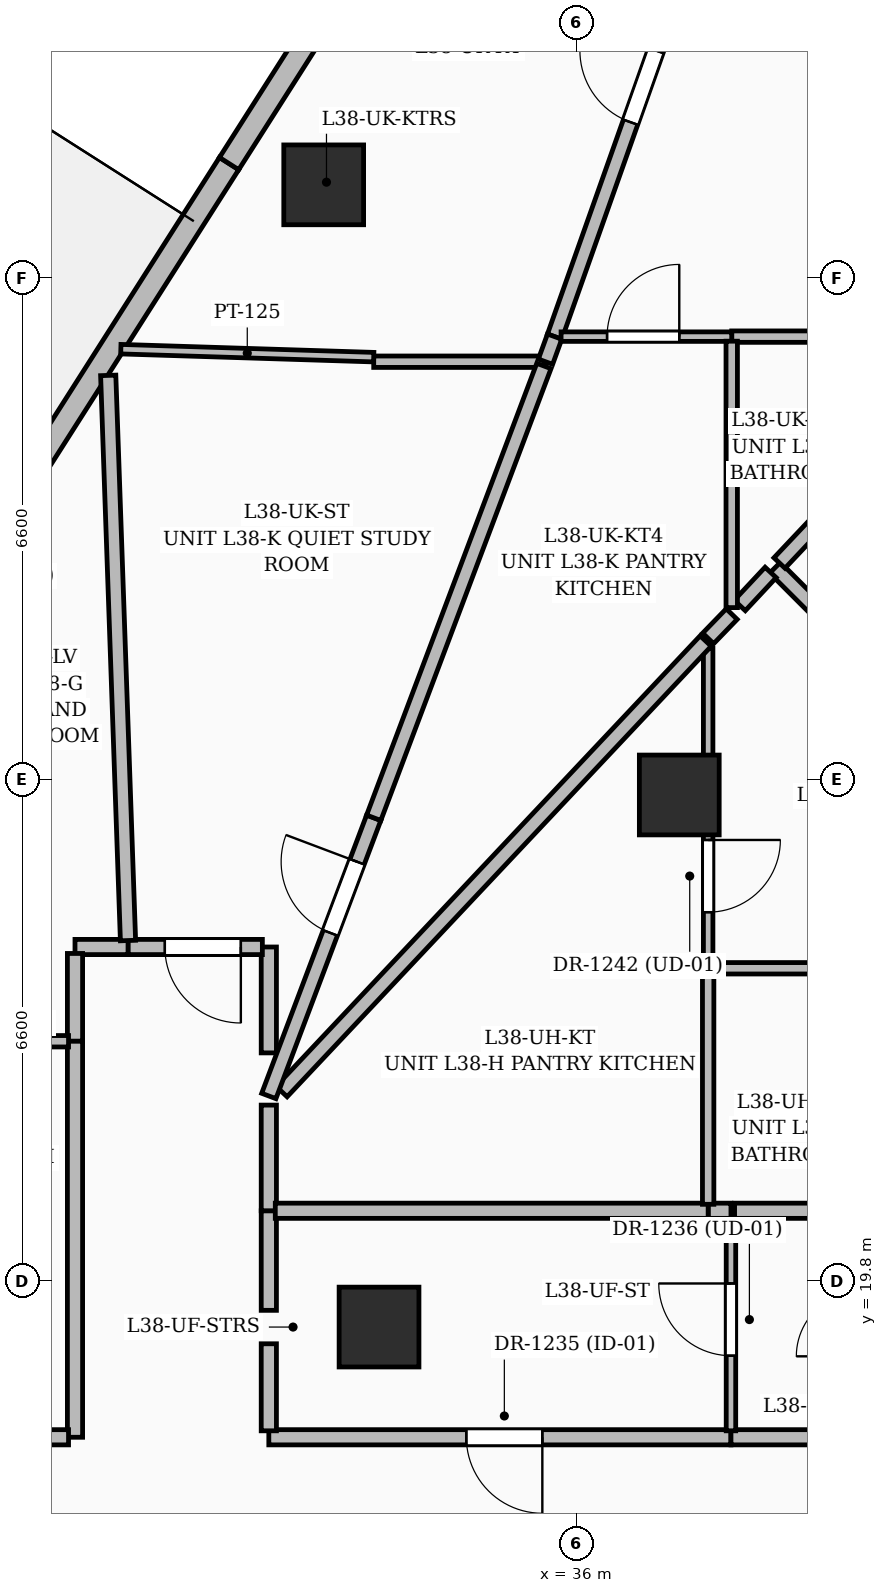
"""IFC4 building model, lengths in metres.
Left out: names, types, materials, properties, quantities, classifications, styles, units other than length and angle.
Written with IfcOpenShell. Run it as: python <this file> out.ifc"""

import sys

from ifc_helpers import new_model, si_unit, direction, frame, frame_2d, origin, origin_2d, place, context, subcontext, project, spatial, rectangle, extrude, element, fill, save


model = new_model("IFC4")
c1 = context("Model", 3, precision=1e-05, world=origin(), true_north=direction((0.0, 1.0)))
c2 = subcontext(c1, "Body", "Model", "MODEL_VIEW")
j1 = project(units=[si_unit("LENGTHUNIT", "METRE"), si_unit("PLANEANGLEUNIT", "RADIAN")], contexts=[c1])
p1 = place(None, origin())
s1 = spatial("IfcSite", under=j1, at=p1, CompositionType="ELEMENT")
p2 = place(p1, origin())
s2 = spatial("IfcBuilding", under=s1, at=p2, CompositionType="ELEMENT")
p3 = place(p2, frame((0.0, 0.0, 150.0)))
s3 = spatial("IfcBuildingStorey", under=s2, at=p3, CompositionType="ELEMENT", Elevation=150.0)
for number, where, z_axis, x_axis in (
    (1, (37.35, 26.2, 0.0), (0.0, 0.0, 1.0), (1.0, 0.0, 0.0)),
    (2, (33.4, 19.2, 0.0), (0.0, 0.0, 1.0), (1.0, 0.0, 0.0)),
    (3, (32.672, 34.227, 0.0), (0.0, 0.0, 1.0), (1.0, 0.0, 0.0)),
):
    element("IfcColumn", number, at=place(p3, frame(where, z_axis=z_axis, x_axis=x_axis)), inside=s3, PredefinedType="COLUMN", context=c2, shape_type="SweptSolid", body=[
        extrude(rectangle(XDim=1.05, YDim=1.05, at=origin_2d()), origin(), (0.0, 0.0, 1.0), 3.6),
    ])
p4 = place(p3, frame((27.328, 28.069, 0.0), z_axis=(0.0, 0.0, 1.0), x_axis=(0.537125937868, 0.843502060975, 0.0)))
e4 = element("IfcWall", 4, at=p4, inside=s3, PredefinedType="SOLIDWALL", context=c2, shape_type="SweptSolid", body=[
    extrude(rectangle(XDim=7.632, YDim=0.3, at=frame_2d((3.816, 0.0))), origin(), (0.0, 0.0, 1.0), 3.35),
])
p5 = place(p4, frame((2.038, 0.0, 0.0)))
e5 = element("IfcOpeningElement", 5, at=p5, cuts=e4, PredefinedType="OPENING", context=c2, shape_type="SweptSolid", body=[
    extrude(rectangle(XDim=1.0, YDim=2.2, at=frame_2d((0.5, 1.1))), frame((0.0, 0.16, 0.0), z_axis=(0.0, -1.0, 0.0), x_axis=(1.0, 0.0, 0.0)), (0.0, 0.0, 1.0), 0.32),
])
p6 = place(p3, frame((31.427, 34.507, 0.0), z_axis=(0.0, 0.0, 1.0), x_axis=(0.537111444199, 0.843511290091, 0.0)))
e6 = element("IfcWall", 6, at=p6, inside=s3, PredefinedType="SOLIDWALL", context=c2, shape_type="SweptSolid", body=[
    extrude(rectangle(XDim=7.632, YDim=0.3, at=frame_2d((3.816, 0.0))), origin(), (0.0, 0.0, 1.0), 3.35),
])
p7 = place(p6, frame((2.325, 0.0, 0.6)))
e7 = element("IfcOpeningElement", 7, at=p7, cuts=e6, PredefinedType="OPENING", context=c2, shape_type="SweptSolid", body=[
    extrude(rectangle(XDim=2.4, YDim=2.1, at=frame_2d((1.2, 1.05))), frame((0.0, 0.16, 0.0), z_axis=(0.0, -1.0, 0.0), x_axis=(1.0, 0.0, 0.0)), (0.0, 0.0, 1.0), 0.32),
])
p8 = place(p3, frame((38.03, 17.75, 0.0), z_axis=(0.0, 0.0, 1.0), x_axis=(-1.0, 0.0, 0.0)))
e8 = element("IfcWall", 8, at=p8, inside=s3, PredefinedType="PARTITIONING", context=c2, shape_type="SweptSolid", body=[
    extrude(rectangle(XDim=6.08, YDim=0.2, at=frame_2d((3.04, 0.0))), origin(), (0.0, 0.0, 1.0), 2.436),
])
p9 = place(p8, frame((2.481, 0.0, 0.0)))
e9 = element("IfcOpeningElement", 9, at=p9, cuts=e8, PredefinedType="OPENING", context=c2, shape_type="SweptSolid", body=[
    extrude(rectangle(XDim=1.0, YDim=2.2, at=frame_2d((0.5, 1.1))), frame((0.0, 0.11, 0.0), z_axis=(0.0, -1.0, 0.0), x_axis=(1.0, 0.0, 0.0)), (0.0, 0.0, 1.0), 0.22),
])
p10 = place(p3, frame((31.95, 17.835, 0.0), z_axis=(0.0, 0.0, 1.0), x_axis=(0.0, 1.0, 0.0)))
e10 = element("IfcWall", 10, at=p10, inside=s3, PredefinedType="PARTITIONING", context=c2, shape_type="SweptSolid", body=[
    extrude(rectangle(XDim=1.145, YDim=0.2, at=frame_2d((0.573, 0.0))), origin(), (0.0, 0.0, 1.0), 3.35),
])
p11 = place(p3, frame((31.95, 19.42, 0.0), z_axis=(0.0, 0.0, 1.0), x_axis=(0.0, 1.0, 0.0)))
e11 = element("IfcWall", 11, at=p11, inside=s3, PredefinedType="PARTITIONING", context=c2, shape_type="SweptSolid", body=[
    extrude(rectangle(XDim=1.31, YDim=0.2, at=frame_2d((0.655, 0.0))), origin(), (0.0, 0.0, 1.0), 1.12),
])
p12 = place(p3, frame((39.74, 17.75, 0.0), z_axis=(0.0, 0.0, 1.0), x_axis=(-1.0, 0.0, 0.0)))
e12 = element("IfcWall", 12, at=p12, inside=s3, PredefinedType="PARTITIONING", context=c2, shape_type="SweptSolid", body=[
    extrude(rectangle(XDim=1.71, YDim=0.2, at=frame_2d((0.855, 0.0))), origin(), (0.0, 0.0, 1.0), 3.35),
])
p13 = place(p3, frame((30.1, 24.2, 0.0), z_axis=(0.0, 0.0, 1.0), x_axis=(-1.0, 0.0, 0.0)))
e13 = element("IfcWall", 13, at=p13, inside=s3, PredefinedType="PARTITIONING", context=c2, shape_type="SweptSolid", body=[
    extrude(rectangle(XDim=0.7, YDim=0.2, at=frame_2d((0.35, 0.0))), origin(), (0.0, 0.0, 1.0), 1.12),
])
p14 = place(p3, frame((29.4, 24.115, 0.0), z_axis=(0.0, 0.0, 1.0), x_axis=(0.0, -1.0, 0.0)))
e14 = element("IfcWall", 14, at=p14, inside=s3, PredefinedType="PARTITIONING", context=c2, shape_type="SweptSolid", body=[
    extrude(rectangle(XDim=1.155, YDim=0.2, at=frame_2d((0.578, 0.0))), origin(), (0.0, 0.0, 1.0), 1.12),
])
p15 = place(p3, frame((29.4, 22.96, 0.0), z_axis=(0.0, 0.0, 1.0), x_axis=(0.0, -1.0, 0.0)))
e15 = element("IfcWall", 15, at=p15, inside=s3, PredefinedType="PARTITIONING", context=c2, shape_type="SweptSolid", body=[
    extrude(rectangle(XDim=5.21, YDim=0.2, at=frame_2d((2.605, 0.0))), origin(), (0.0, 0.0, 1.0), 1.12),
])
p16 = place(p3, frame((29.315, 17.75, 0.0), z_axis=(0.0, 0.0, 1.0), x_axis=(-1.0, 0.0, 0.0)))
e16 = element("IfcWall", 16, at=p16, inside=s3, PredefinedType="PARTITIONING", context=c2, shape_type="SweptSolid", body=[
    extrude(rectangle(XDim=2.115, YDim=0.2, at=frame_2d((1.058, 0.0))), origin(), (0.0, 0.0, 1.0), 2.86),
])
p17 = place(p16, frame((0.515, 0.0, 0.0)))
e17 = element("IfcOpeningElement", 17, at=p17, cuts=e16, PredefinedType="OPENING", context=c2, shape_type="SweptSolid", body=[
    extrude(rectangle(XDim=1.0, YDim=2.2, at=frame_2d((0.5, 1.1))), frame((0.0, 0.11, 0.0), z_axis=(0.0, -1.0, 0.0), x_axis=(1.0, 0.0, 0.0)), (0.0, 0.0, 1.0), 0.22),
])
p18 = place(p3, frame((31.95, 20.73, 0.0), z_axis=(0.0, 0.0, 1.0), x_axis=(0.0, 1.0, 0.0)))
e18 = element("IfcWall", 18, at=p18, inside=s3, PredefinedType="PARTITIONING", context=c2, shape_type="SweptSolid", body=[
    extrude(rectangle(XDim=1.39, YDim=0.2, at=frame_2d((0.695, 0.0))), origin(), (0.0, 0.0, 1.0), 1.12),
])
p19 = place(p3, frame((31.95, 22.807, 0.0), z_axis=(0.0, 0.0, 1.0), x_axis=(0.0, 1.0, 0.0)))
e19 = element("IfcWall", 19, at=p19, inside=s3, PredefinedType="PARTITIONING", context=c2, shape_type="SweptSolid", body=[
    extrude(rectangle(XDim=1.393, YDim=0.2, at=frame_2d((0.697, 0.0))), origin(), (0.0, 0.0, 1.0), 3.35),
])
p20 = place(p3, frame((31.865, 24.2, 0.0), z_axis=(0.0, 0.0, 1.0), x_axis=(-1.0, 0.0, 0.0)))
e20 = element("IfcWall", 20, at=p20, inside=s3, PredefinedType="PARTITIONING", context=c2, shape_type="SweptSolid", body=[
    extrude(rectangle(XDim=1.765, YDim=0.2, at=frame_2d((0.882, 0.0))), origin(), (0.0, 0.0, 1.0), 2.86),
])
p21 = place(p20, frame((0.283, 0.0, 0.0)))
e21 = element("IfcOpeningElement", 21, at=p21, cuts=e20, PredefinedType="OPENING", context=c2, shape_type="SweptSolid", body=[
    extrude(rectangle(XDim=1.0, YDim=2.2, at=frame_2d((0.5, 1.1))), frame((0.0, 0.11, 0.0), z_axis=(0.0, -1.0, 0.0), x_axis=(1.0, 0.0, 0.0)), (0.0, 0.0, 1.0), 0.22),
])
p22 = place(p3, frame((38.03, 17.835, 0.0), z_axis=(0.0, 0.0, 1.0), x_axis=(0.0, 1.0, 0.0)))
e22 = element("IfcWall", 22, at=p22, inside=s3, PredefinedType="PARTITIONING", context=c2, shape_type="SweptSolid", body=[
    extrude(rectangle(XDim=2.895, YDim=0.125, at=frame_2d((1.448, 0.0))), origin(), (0.0, 0.0, 1.0), 3.35),
])
p23 = place(p22, frame((0.988, 0.0, 0.0)))
e23 = element("IfcOpeningElement", 23, at=p23, cuts=e22, PredefinedType="OPENING", context=c2, shape_type="SweptSolid", body=[
    extrude(rectangle(XDim=0.95, YDim=2.2, at=frame_2d((0.475, 1.1))), frame((0.0, 0.072, 0.0), z_axis=(0.0, -1.0, 0.0), x_axis=(1.0, 0.0, 0.0)), (0.0, 0.0, 1.0), 0.145),
])
p24 = place(p3, frame((38.03, 20.73, 0.0), z_axis=(0.0, 0.0, 1.0), x_axis=(-1.0, 0.0, 0.0)))
e24 = element("IfcWall", 24, at=p24, inside=s3, PredefinedType="PARTITIONING", context=c2, shape_type="SweptSolid", body=[
    extrude(rectangle(XDim=0.3, YDim=0.2, at=frame_2d((0.15, 0.0))), origin(), (0.0, 0.0, 1.0), 3.35),
])
p25 = place(p3, frame((37.73, 20.73, 0.0), z_axis=(0.0, 0.0, 1.0), x_axis=(-1.0, 0.0, 0.0)))
e25 = element("IfcWall", 25, at=p25, inside=s3, PredefinedType="PARTITIONING", context=c2, shape_type="SweptSolid", body=[
    extrude(rectangle(XDim=5.695, YDim=0.2, at=frame_2d((2.848, 0.0))), origin(), (0.0, 0.0, 1.0), 1.12),
])
p26 = place(p3, frame((39.68, 20.73, 0.0), z_axis=(0.0, 0.0, 1.0), x_axis=(-1.0, 0.0, 0.0)))
e26 = element("IfcWall", 26, at=p26, inside=s3, PredefinedType="PARTITIONING", context=c2, shape_type="SweptSolid", body=[
    extrude(rectangle(XDim=1.603, YDim=0.2, at=frame_2d((0.801, 0.0))), origin(), (0.0, 0.0, 1.0), 3.35),
])
p27 = place(p3, frame((27.248, 22.96, 0.0), z_axis=(0.0, 0.0, 1.0), x_axis=(1.0, 0.0, 0.0)))
e27 = element("IfcWall", 27, at=p27, inside=s3, PredefinedType="PARTITIONING", context=c2, shape_type="SweptSolid", body=[
    extrude(rectangle(XDim=2.067, YDim=0.15, at=frame_2d((1.034, 0.0))), origin(), (0.0, 0.0, 1.0), 1.12),
])
p28 = place(p3, frame((30.097, 24.285, 0.0), z_axis=(0.0, 0.0, 1.0), x_axis=(-0.035014963649, 0.999386788146, 0.0)))
e28 = element("IfcWall", 28, at=p28, inside=s3, PredefinedType="PARTITIONING", context=c2, shape_type="SweptSolid", body=[
    extrude(rectangle(XDim=7.44, YDim=0.2, at=frame_2d((3.72, 0.0))), origin(), (0.0, 0.0, 1.0), 2.57),
])
p29 = place(p3, frame((37.73, 23.92, 0.0), z_axis=(0.0, 0.0, 1.0), x_axis=(1.0, 0.0, 0.0)))
e29 = element("IfcWall", 29, at=p29, inside=s3, PredefinedType="PARTITIONING", context=c2, shape_type="SweptSolid", body=[
    extrude(rectangle(XDim=3.635, YDim=0.15, at=frame_2d((1.817, 0.0))), origin(), (0.0, 0.0, 1.0), 3.35),
])
p30 = place(p29, frame((1.435, 0.0, 0.0)))
e30 = element("IfcOpeningElement", 30, at=p30, cuts=e29, PredefinedType="OPENING", context=c2, shape_type="SweptSolid", body=[
    extrude(rectangle(XDim=0.85, YDim=2.1, at=frame_2d((0.425, 1.05))), frame((0.0, 0.085, 0.0), z_axis=(0.0, -1.0, 0.0), x_axis=(1.0, 0.0, 0.0)), (0.0, 0.0, 1.0), 0.17),
])
p31 = place(p3, frame((37.73, 28.13, 0.0), z_axis=(0.0, 0.0, 1.0), x_axis=(0.0, -1.0, 0.0)))
e31 = element("IfcWall", 31, at=p31, inside=s3, PredefinedType="PARTITIONING", context=c2, shape_type="SweptSolid", body=[
    extrude(rectangle(XDim=4.15, YDim=0.125, at=frame_2d((2.075, 0.0))), origin(), (0.0, 0.0, 1.0), 3.35),
])
p32 = place(p31, frame((2.522, 0.0, 0.0)))
e32 = element("IfcOpeningElement", 32, at=p32, cuts=e31, PredefinedType="OPENING", context=c2, shape_type="SweptSolid", body=[
    extrude(rectangle(XDim=0.95, YDim=2.2, at=frame_2d((0.475, 1.1))), frame((0.0, 0.072, 0.0), z_axis=(0.0, -1.0, 0.0), x_axis=(1.0, 0.0, 0.0)), (0.0, 0.0, 1.0), 0.145),
])
p33 = place(p3, frame((43.54, 24.26, 0.0), z_axis=(0.0, 0.0, 1.0), x_axis=(-0.707089271826, 0.707124290114, 0.0)))
e33 = element("IfcWall", 33, at=p33, inside=s3, PredefinedType="PARTITIONING", context=c2, shape_type="SweptSolid", body=[
    extrude(rectangle(XDim=6.972, YDim=0.2, at=frame_2d((3.486, 0.0))), origin(), (0.0, 0.0, 1.0), 2.37),
])
p34 = place(p3, frame((38.552, 29.128, 0.0), z_axis=(0.0, 0.0, 1.0), x_axis=(-0.682698223225, -0.730700442045, 0.0)))
e34 = element("IfcWall", 34, at=p34, inside=s3, PredefinedType="PARTITIONING", context=c2, shape_type="SweptSolid", body=[
    extrude(rectangle(XDim=0.595, YDim=0.2, at=frame_2d((0.297, 0.0))), origin(), (0.0, 0.0, 1.0), 3.35),
])
p35 = place(p3, frame((38.04, 28.58, 0.0), z_axis=(0.0, 0.0, 1.0), x_axis=(-0.695786383721, -0.718248778786, 0.0)))
e35 = element("IfcWall", 35, at=p35, inside=s3, PredefinedType="PARTITIONING", context=c2, shape_type="SweptSolid", body=[
    extrude(rectangle(XDim=0.446, YDim=0.2, at=frame_2d((0.223, 0.0))), origin(), (0.0, 0.0, 1.0), 2.86),
])
p36 = place(p3, frame((37.73, 23.86, 0.0), z_axis=(0.0, 0.0, 1.0), x_axis=(0.0, -1.0, 0.0)))
e36 = element("IfcWall", 36, at=p36, inside=s3, PredefinedType="PARTITIONING", context=c2, shape_type="SweptSolid", body=[
    extrude(rectangle(XDim=3.045, YDim=0.15, at=frame_2d((1.522, 0.0))), origin(), (0.0, 0.0, 1.0), 3.35),
])
p37 = place(p3, frame((37.698, 28.225, 0.0), z_axis=(0.0, 0.0, 1.0), x_axis=(-0.685445151362, -0.728124264445, 0.0)))
e37 = element("IfcWall", 37, at=p37, inside=s3, PredefinedType="PARTITIONING", context=c2, shape_type="SweptSolid", body=[
    extrude(rectangle(XDim=8.14, YDim=0.2, at=frame_2d((4.07, 0.0))), origin(), (0.0, 0.0, 1.0), 1.12),
])
p38 = place(p3, frame((41.384, 32.128, 0.0), z_axis=(0.0, 0.0, 1.0), x_axis=(-0.686445904879, -0.727180871362, 0.0)))
e38 = element("IfcWall", 38, at=p38, inside=s3, PredefinedType="PARTITIONING", context=c2, shape_type="SweptSolid", body=[
    extrude(rectangle(XDim=3.956, YDim=0.2, at=frame_2d((1.978, 0.0))), origin(), (0.0, 0.0, 1.0), 2.86),
])
p39 = place(p3, frame((31.95, 22.24, 0.0), z_axis=(0.0, 0.0, 1.0), x_axis=(0.352839728949, 0.9356837744, 0.0)))
e39 = element("IfcWall", 39, at=p39, inside=s3, PredefinedType="PARTITIONING", context=c2, shape_type="SweptSolid", body=[
    extrude(rectangle(XDim=3.911, YDim=0.2, at=frame_2d((1.956, 0.0))), origin(), (0.0, 0.0, 1.0), 3.35),
])
p40 = place(p39, frame((2.293, 0.0, 0.0)))
e40 = element("IfcOpeningElement", 40, at=p40, cuts=e39, PredefinedType="OPENING", context=c2, shape_type="SweptSolid", body=[
    extrude(rectangle(XDim=1.0, YDim=2.2, at=frame_2d((0.5, 1.1))), frame((0.0, 0.11, 0.0), z_axis=(0.0, -1.0, 0.0), x_axis=(1.0, 0.0, 0.0)), (0.0, 0.0, 1.0), 0.22),
])
p41 = place(p3, frame((35.59, 31.9, 0.0), z_axis=(0.0, 0.0, 1.0), x_axis=(-1.0, 0.0, 0.0)))
e41 = element("IfcWall", 41, at=p41, inside=s3, PredefinedType="PARTITIONING", context=c2, shape_type="SweptSolid", body=[
    extrude(rectangle(XDim=2.26, YDim=0.15, at=frame_2d((1.13, 0.0))), origin(), (0.0, 0.0, 1.0), 1.12),
])
p42 = place(p3, frame((33.33, 25.9, 0.0), z_axis=(0.0, 0.0, 1.0), x_axis=(0.352466793528, 0.935824320832, 0.0)))
e42 = element("IfcWall", 42, at=p42, inside=s3, PredefinedType="PARTITIONING", context=c2, shape_type="SweptSolid", body=[
    extrude(rectangle(XDim=6.352, YDim=0.2, at=frame_2d((3.176, 0.0))), origin(), (0.0, 0.0, 1.0), 1.12),
])
p43 = place(p3, frame((35.71, 32.23, 0.0), z_axis=(0.0, 0.0, 1.0), x_axis=(0.333750909116, 0.942661302199, 0.0)))
e43 = element("IfcWall", 43, at=p43, inside=s3, PredefinedType="PARTITIONING", context=c2, shape_type="SweptSolid", body=[
    extrude(rectangle(XDim=6.763, YDim=0.2, at=frame_2d((3.381, 0.0))), origin(), (0.0, 0.0, 1.0), 2.57),
])
p44 = place(p43, frame((2.993, 0.0, 0.0)))
e44 = element("IfcOpeningElement", 44, at=p44, cuts=e43, PredefinedType="OPENING", context=c2, shape_type="SweptSolid", body=[
    extrude(rectangle(XDim=1.0, YDim=2.2, at=frame_2d((0.5, 1.1))), frame((0.0, 0.11, 0.0), z_axis=(0.0, -1.0, 0.0), x_axis=(1.0, 0.0, 0.0)), (0.0, 0.0, 1.0), 0.22),
])
p45 = place(p3, frame((35.59, 31.9, 0.0), z_axis=(0.0, 0.0, 1.0), x_axis=(0.341352290296, 0.939935430713, 0.0)))
e45 = element("IfcWall", 45, at=p45, inside=s3, PredefinedType="PARTITIONING", context=c2, shape_type="SweptSolid", body=[
    extrude(rectangle(XDim=0.351, YDim=0.2, at=frame_2d((0.176, 0.0))), origin(), (0.0, 0.0, 1.0), 3.35),
])
p46 = place(p3, frame((38.04, 32.23, 0.0), z_axis=(0.0, 0.0, 1.0), x_axis=(1.0, 0.0, 0.0)))
e46 = element("IfcWall", 46, at=p46, inside=s3, PredefinedType="PARTITIONING", context=c2, shape_type="SweptSolid", body=[
    extrude(rectangle(XDim=3.355, YDim=0.15, at=frame_2d((1.677, 0.0))), origin(), (0.0, 0.0, 1.0), 3.35),
])
p47 = place(p46, frame((1.295, 0.0, 0.0)))
e47 = element("IfcOpeningElement", 47, at=p47, cuts=e46, PredefinedType="OPENING", context=c2, shape_type="SweptSolid", body=[
    extrude(rectangle(XDim=0.85, YDim=2.1, at=frame_2d((0.425, 1.05))), frame((0.0, 0.085, 0.0), z_axis=(0.0, -1.0, 0.0), x_axis=(1.0, 0.0, 0.0)), (0.0, 0.0, 1.0), 0.17),
])
p48 = place(p3, frame((35.795, 32.23, 0.0), z_axis=(0.0, 0.0, 1.0), x_axis=(1.0, 0.0, 0.0)))
e48 = element("IfcWall", 48, at=p48, inside=s3, PredefinedType="PARTITIONING", context=c2, shape_type="SweptSolid", body=[
    extrude(rectangle(XDim=2.245, YDim=0.125, at=frame_2d((1.123, 0.0))), origin(), (0.0, 0.0, 1.0), 3.35),
])
p49 = place(p48, frame((0.605, 0.0, 0.0)))
e49 = element("IfcOpeningElement", 49, at=p49, cuts=e48, PredefinedType="OPENING", context=c2, shape_type="SweptSolid", body=[
    extrude(rectangle(XDim=0.95, YDim=2.2, at=frame_2d((0.475, 1.1))), frame((0.0, 0.072, 0.0), z_axis=(0.0, -1.0, 0.0), x_axis=(1.0, 0.0, 0.0)), (0.0, 0.0, 1.0), 0.145),
])
p50 = place(p3, frame((38.04, 32.17, 0.0), z_axis=(0.0, 0.0, 1.0), x_axis=(0.0, -1.0, 0.0)))
e50 = element("IfcWall", 50, at=p50, inside=s3, PredefinedType="PARTITIONING", context=c2, shape_type="SweptSolid", body=[
    extrude(rectangle(XDim=3.505, YDim=0.15, at=frame_2d((1.752, 0.0))), origin(), (0.0, 0.0, 1.0), 2.86),
])
p51 = place(p3, frame((33.33, 31.96, 0.0), z_axis=(0.0, 0.0, 1.0), x_axis=(-0.999502585392, 0.03153699088, 0.0)))
e51 = element("IfcWall", 51, at=p51, inside=s3, PredefinedType="PARTITIONING", context=c2, shape_type="SweptSolid", body=[
    extrude(rectangle(XDim=3.329, YDim=0.125, at=frame_2d((1.665, 0.0))), origin(), (0.0, 0.0, 1.0), 1.12),
])
p52 = place(p9, origin())
e52 = element("IfcDoor", 52, at=p52, inside=s3, OperationType="SINGLE_SWING_LEFT", PredefinedType="DOOR", context=c2, shape_type="SweptSolid", body=[
    extrude(rectangle(XDim=1.0, YDim=2.2, at=frame_2d((0.5, 1.1))), frame((0.0, 0.025, 0.0), z_axis=(0.0, -1.0, 0.0), x_axis=(1.0, 0.0, 0.0)), (0.0, 0.0, 1.0), 0.05),
])
fill(e9, e52)
p53 = place(p23, origin())
e53 = element("IfcDoor", 53, at=p53, inside=s3, OperationType="SINGLE_SWING_RIGHT", PredefinedType="DOOR", context=c2, shape_type="SweptSolid", body=[
    extrude(rectangle(XDim=0.95, YDim=2.2, at=frame_2d((0.475, 1.1))), frame((0.0, 0.025, 0.0), z_axis=(0.0, -1.0, 0.0), x_axis=(1.0, 0.0, 0.0)), (0.0, 0.0, 1.0), 0.05),
])
fill(e23, e53)
p54 = place(p32, origin())
e54 = element("IfcDoor", 54, at=p54, inside=s3, OperationType="SINGLE_SWING_LEFT", PredefinedType="DOOR", context=c2, shape_type="SweptSolid", body=[
    extrude(rectangle(XDim=0.95, YDim=2.2, at=frame_2d((0.475, 1.1))), frame((0.0, 0.025, 0.0), z_axis=(0.0, -1.0, 0.0), x_axis=(1.0, 0.0, 0.0)), (0.0, 0.0, 1.0), 0.05),
])
fill(e32, e54)
p55 = place(p21, origin())
e55 = element("IfcDoor", 55, at=p55, inside=s3, OperationType="SINGLE_SWING_LEFT", PredefinedType="DOOR", context=c2, shape_type="SweptSolid", body=[
    extrude(rectangle(XDim=1.0, YDim=2.2, at=frame_2d((0.5, 1.1))), frame((0.0, 0.025, 0.0), z_axis=(0.0, -1.0, 0.0), x_axis=(1.0, 0.0, 0.0)), (0.0, 0.0, 1.0), 0.05),
])
fill(e21, e55)
p56 = place(p49, origin())
e56 = element("IfcDoor", 56, at=p56, inside=s3, OperationType="SINGLE_SWING_RIGHT", PredefinedType="DOOR", context=c2, shape_type="SweptSolid", body=[
    extrude(rectangle(XDim=0.95, YDim=2.2, at=frame_2d((0.475, 1.1))), frame((0.0, 0.025, 0.0), z_axis=(0.0, -1.0, 0.0), x_axis=(1.0, 0.0, 0.0)), (0.0, 0.0, 1.0), 0.05),
])
fill(e49, e56)
p57 = place(p40, origin())
e57 = element("IfcDoor", 57, at=p57, inside=s3, OperationType="SINGLE_SWING_RIGHT", PredefinedType="DOOR", context=c2, shape_type="SweptSolid", body=[
    extrude(rectangle(XDim=1.0, YDim=2.2, at=frame_2d((0.5, 1.1))), frame((0.0, 0.025, 0.0), z_axis=(0.0, -1.0, 0.0), x_axis=(1.0, 0.0, 0.0)), (0.0, 0.0, 1.0), 0.05),
])
fill(e40, e57)
p58 = place(p44, origin())
e58 = element("IfcDoor", 58, at=p58, inside=s3, OperationType="SINGLE_SWING_RIGHT", PredefinedType="DOOR", context=c2, shape_type="SweptSolid", body=[
    extrude(rectangle(XDim=1.0, YDim=2.2, at=frame_2d((0.5, 1.1))), frame((0.0, 0.025, 0.0), z_axis=(0.0, -1.0, 0.0), x_axis=(1.0, 0.0, 0.0)), (0.0, 0.0, 1.0), 0.05),
])
fill(e44, e58)
save(model, sys.argv[1])
